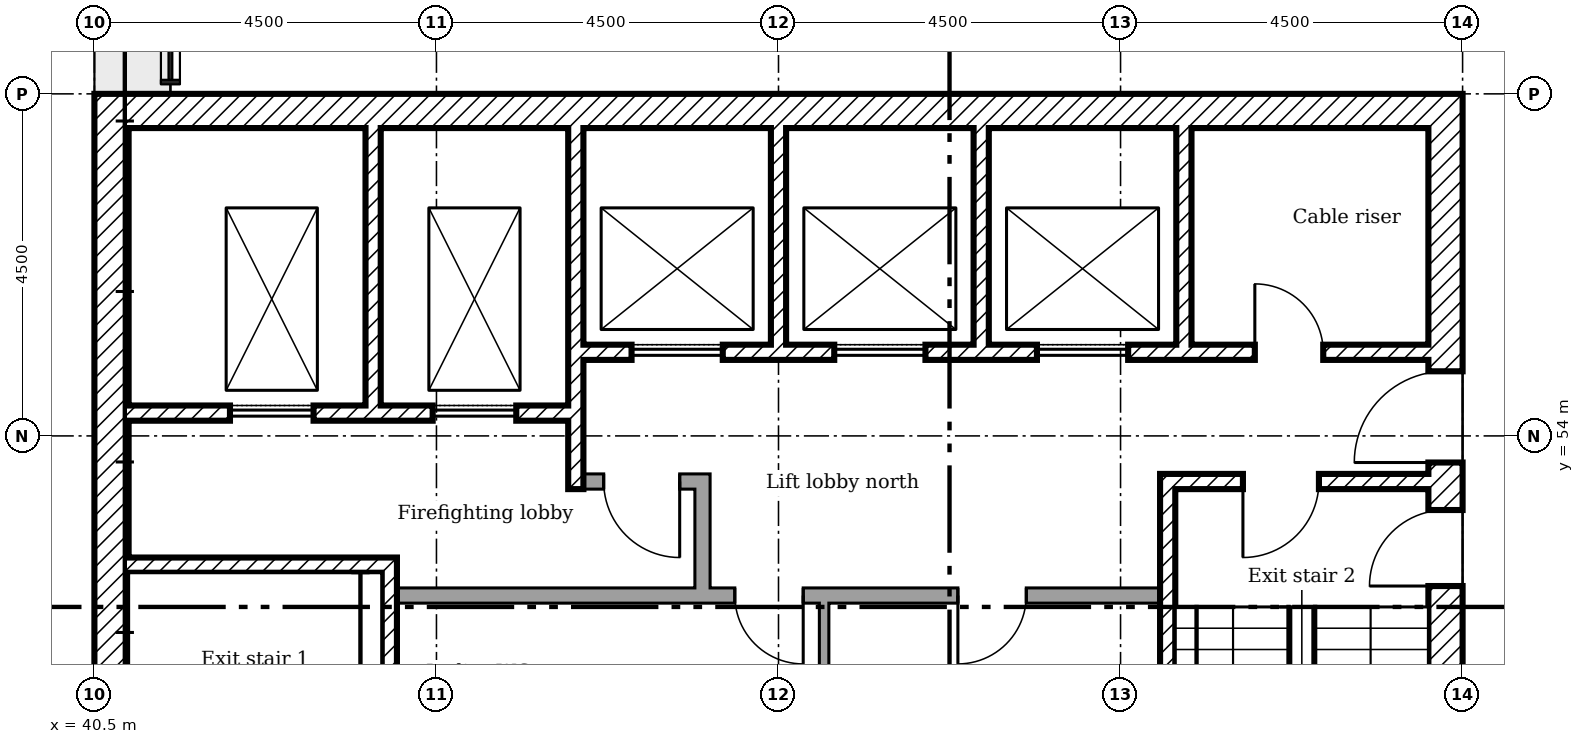
"""IFC4 building model, lengths in metres.
Left out: names, types, materials, properties, quantities, classifications, styles, units other than length and angle.
Written with IfcOpenShell. Run it as: python <this file> out.ifc"""

import sys

from ifc_helpers import new_model, si_unit, direction, frame, frame_2d, origin, place, context, subcontext, project, spatial, rectangle, extrude, element, fill, save


model = new_model("IFC4")
c1 = context("Model", 3, precision=1e-05, world=origin(), true_north=direction((0.0, 1.0)))
c2 = subcontext(c1, "Body", "Model", "MODEL_VIEW")
j1 = project(units=[si_unit("LENGTHUNIT", "METRE"), si_unit("PLANEANGLEUNIT", "RADIAN")], contexts=[c1])
p1 = place(None, origin())
s1 = spatial("IfcSite", under=j1, at=p1, CompositionType="ELEMENT")
p2 = place(p1, origin())
s2 = spatial("IfcBuilding", under=s1, at=p2, CompositionType="ELEMENT")
p3 = place(p2, frame((0.0, 0.0, 255.2)))
s3 = spatial("IfcBuildingStorey", under=s2, at=p3, CompositionType="ELEMENT", Elevation=255.2)
p4 = place(p3, frame((58.275, 40.5, 0.0), z_axis=(0.0, 0.0, 1.0), x_axis=(0.0, 1.0, 0.0)))
e1 = element("IfcWall", 1, at=p4, inside=s3, PredefinedType="SHEAR", context=c2, shape_type="SweptSolid", body=[
    extrude(rectangle(XDim=18.0, YDim=0.45, at=frame_2d((9.0, 0.0))), origin(), (0.0, 0.0, 1.0), 3.78),
])
p5 = place(p4, frame((13.15, 0.0, 0.0)))
e2 = element("IfcOpeningElement", 2, at=p5, cuts=e1, PredefinedType="OPENING", context=c2, shape_type="SweptSolid", body=[
    extrude(rectangle(XDim=1.2, YDim=2.1, at=frame_2d((0.6, 1.05))), frame((0.0, 0.235, 0.0), z_axis=(0.0, -1.0, 0.0), x_axis=(1.0, 0.0, 0.0)), (0.0, 0.0, 1.0), 0.47),
])
p6 = place(p4, frame((3.9, 0.0, 0.0)))
e3 = element("IfcOpeningElement", 3, at=p6, cuts=e1, PredefinedType="OPENING", context=c2, shape_type="SweptSolid", body=[
    extrude(rectangle(XDim=1.8, YDim=2.1, at=frame_2d((0.9, 1.05))), frame((0.0, 0.235, 0.0), z_axis=(0.0, -1.0, 0.0), x_axis=(1.0, 0.0, 0.0)), (0.0, 0.0, 1.0), 0.47),
])
p7 = place(p4, frame((11.525, 0.0, 0.0)))
e4 = element("IfcOpeningElement", 4, at=p7, cuts=e1, PredefinedType="OPENING", context=c2, shape_type="SweptSolid", body=[
    extrude(rectangle(XDim=1.0, YDim=2.1, at=frame_2d((0.5, 1.05))), frame((0.0, 0.235, 0.0), z_axis=(0.0, -1.0, 0.0), x_axis=(1.0, 0.0, 0.0)), (0.0, 0.0, 1.0), 0.47),
])
p8 = place(p3, frame((40.5, 58.275, 0.0)))
e5 = element("IfcWall", 5, at=p8, inside=s3, PredefinedType="SHEAR", context=c2, shape_type="SweptSolid", body=[
    extrude(rectangle(XDim=17.55, YDim=0.45, at=frame_2d((8.775, 0.0))), origin(), (0.0, 0.0, 1.0), 3.78),
])
p9 = place(p3, frame((40.725, 40.95, 0.0), z_axis=(0.0, 0.0, 1.0), x_axis=(0.0, 1.0, 0.0)))
e6 = element("IfcWall", 6, at=p9, inside=s3, PredefinedType="SHEAR", context=c2, shape_type="SweptSolid", body=[
    extrude(rectangle(XDim=17.1, YDim=0.45, at=frame_2d((8.55, 0.0))), origin(), (0.0, 0.0, 1.0), 3.78),
])
p10 = place(p3, frame((44.167, 58.05, 0.0), z_axis=(0.0, 0.0, 1.0), x_axis=(0.0, -1.0, 0.0)))
e7 = element("IfcWall", 7, at=p10, inside=s3, PredefinedType="SHEAR", context=c2, shape_type="SweptSolid", body=[
    extrude(rectangle(XDim=3.65, YDim=0.2, at=frame_2d((1.825, 0.0))), origin(), (0.0, 0.0, 1.0), 3.78),
])
p11 = place(p3, frame((46.833, 58.05, 0.0), z_axis=(0.0, 0.0, 1.0), x_axis=(0.0, -1.0, 0.0)))
e8 = element("IfcWall", 8, at=p11, inside=s3, PredefinedType="SHEAR", context=c2, shape_type="SweptSolid", body=[
    extrude(rectangle(XDim=4.75, YDim=0.2, at=frame_2d((2.375, 0.0))), origin(), (0.0, 0.0, 1.0), 3.78),
])
for number, where, z_axis, x_axis in (
    (9, (49.5, 58.05, 0.0), (0.0, 0.0, 1.0), (0.0, -1.0, 0.0)),
    (10, (52.167, 58.05, 0.0), (0.0, 0.0, 1.0), (0.0, -1.0, 0.0)),
    (11, (54.833, 58.05, 0.0), (0.0, 0.0, 1.0), (0.0, -1.0, 0.0)),
):
    element("IfcWall", number, at=place(p3, frame(where, z_axis=z_axis, x_axis=x_axis)), inside=s3, PredefinedType="SHEAR", context=c2, shape_type="SweptSolid", body=[
        extrude(rectangle(XDim=2.85, YDim=0.2, at=frame_2d((1.425, 0.0))), origin(), (0.0, 0.0, 1.0), 3.78),
    ])
p12 = place(p3, frame((48.5, 51.9, 0.0), z_axis=(0.0, 0.0, 1.0), x_axis=(0.0, 1.0, 0.0)))
e12 = element("IfcWall", 12, at=p12, inside=s3, PredefinedType="PARTITIONING", context=c2, shape_type="SweptSolid", body=[
    extrude(rectangle(XDim=1.6, YDim=0.2, at=frame_2d((0.8, 0.0))), origin(), (0.0, 0.0, 1.0), 3.78),
])
p13 = place(p3, frame((46.933, 53.4, 0.0)))
e13 = element("IfcWall", 13, at=p13, inside=s3, PredefinedType="PARTITIONING", context=c2, shape_type="SweptSolid", body=[
    extrude(rectangle(XDim=1.467, YDim=0.2, at=frame_2d((0.733, 0.0))), origin(), (0.0, 0.0, 1.0), 3.78),
])
p14 = place(p13, frame((0.267, 0.0, 0.0)))
e14 = element("IfcOpeningElement", 14, at=p14, cuts=e13, PredefinedType="OPENING", context=c2, shape_type="SweptSolid", body=[
    extrude(rectangle(XDim=1.0, YDim=2.1, at=frame_2d((0.5, 1.05))), frame((0.0, 0.11, 0.0), z_axis=(0.0, -1.0, 0.0), x_axis=(1.0, 0.0, 0.0)), (0.0, 0.0, 1.0), 0.22),
])
p15 = place(p3, frame((46.933, 55.1, 0.0)))
e15 = element("IfcWall", 15, at=p15, inside=s3, PredefinedType="SHEAR", context=c2, shape_type="SweptSolid", body=[
    extrude(rectangle(XDim=11.117, YDim=0.2, at=frame_2d((5.558, 0.0))), origin(), (0.0, 0.0, 1.0), 3.78),
])
p16 = place(p15, frame((8.833, 0.0, 0.0)))
e16 = element("IfcOpeningElement", 16, at=p16, cuts=e15, PredefinedType="OPENING", context=c2, shape_type="SweptSolid", body=[
    extrude(rectangle(XDim=0.9, YDim=2.1, at=frame_2d((0.45, 1.05))), frame((0.0, 0.11, 0.0), z_axis=(0.0, -1.0, 0.0), x_axis=(1.0, 0.0, 0.0)), (0.0, 0.0, 1.0), 0.22),
])
p17 = place(p15, frame((0.633, 0.0, 0.0)))
e17 = element("IfcOpeningElement", 17, at=p17, cuts=e15, PredefinedType="OPENING", context=c2, shape_type="SweptSolid", body=[
    extrude(rectangle(XDim=1.2, YDim=2.1, at=frame_2d((0.6, 1.05))), frame((0.0, 0.11, 0.0), z_axis=(0.0, -1.0, 0.0), x_axis=(1.0, 0.0, 0.0)), (0.0, 0.0, 1.0), 0.22),
])
p18 = place(p15, frame((3.3, 0.0, 0.0)))
e18 = element("IfcOpeningElement", 18, at=p18, cuts=e15, PredefinedType="OPENING", context=c2, shape_type="SweptSolid", body=[
    extrude(rectangle(XDim=1.2, YDim=2.1, at=frame_2d((0.6, 1.05))), frame((0.0, 0.11, 0.0), z_axis=(0.0, -1.0, 0.0), x_axis=(1.0, 0.0, 0.0)), (0.0, 0.0, 1.0), 0.22),
])
p19 = place(p15, frame((5.967, 0.0, 0.0)))
e19 = element("IfcOpeningElement", 19, at=p19, cuts=e15, PredefinedType="OPENING", context=c2, shape_type="SweptSolid", body=[
    extrude(rectangle(XDim=1.2, YDim=2.1, at=frame_2d((0.6, 1.05))), frame((0.0, 0.11, 0.0), z_axis=(0.0, -1.0, 0.0), x_axis=(1.0, 0.0, 0.0)), (0.0, 0.0, 1.0), 0.22),
])
p20 = place(p3, frame((40.95, 54.3, 0.0)))
e20 = element("IfcWall", 20, at=p20, inside=s3, PredefinedType="SHEAR", context=c2, shape_type="SweptSolid", body=[
    extrude(rectangle(XDim=5.783, YDim=0.2, at=frame_2d((2.892, 0.0))), origin(), (0.0, 0.0, 1.0), 3.78),
])
p21 = place(p20, frame((1.333, 0.0, 0.0)))
e21 = element("IfcOpeningElement", 21, at=p21, cuts=e20, PredefinedType="OPENING", context=c2, shape_type="SweptSolid", body=[
    extrude(rectangle(XDim=1.1, YDim=2.1, at=frame_2d((0.55, 1.05))), frame((0.0, 0.11, 0.0), z_axis=(0.0, -1.0, 0.0), x_axis=(1.0, 0.0, 0.0)), (0.0, 0.0, 1.0), 0.22),
])
p22 = place(p20, frame((4.0, 0.0, 0.0)))
e22 = element("IfcOpeningElement", 22, at=p22, cuts=e20, PredefinedType="OPENING", context=c2, shape_type="SweptSolid", body=[
    extrude(rectangle(XDim=1.1, YDim=2.1, at=frame_2d((0.55, 1.05))), frame((0.0, 0.11, 0.0), z_axis=(0.0, -1.0, 0.0), x_axis=(1.0, 0.0, 0.0)), (0.0, 0.0, 1.0), 0.22),
])
p23 = place(p3, frame((44.38, 45.5, 0.0), z_axis=(0.0, 0.0, 1.0), x_axis=(0.0, 1.0, 0.0)))
e23 = element("IfcWall", 23, at=p23, inside=s3, PredefinedType="SHEAR", context=c2, shape_type="SweptSolid", body=[
    extrude(rectangle(XDim=6.9, YDim=0.2, at=frame_2d((3.45, 0.0))), origin(), (0.0, 0.0, 1.0), 3.78),
])
p24 = place(p3, frame((40.95, 52.3, 0.0)))
e24 = element("IfcWall", 24, at=p24, inside=s3, PredefinedType="SHEAR", context=c2, shape_type="SweptSolid", body=[
    extrude(rectangle(XDim=3.33, YDim=0.2, at=frame_2d((1.665, 0.0))), origin(), (0.0, 0.0, 1.0), 3.78),
])
p25 = place(p3, frame((54.52, 53.4, 0.0)))
e25 = element("IfcWall", 25, at=p25, inside=s3, PredefinedType="SHEAR", context=c2, shape_type="SweptSolid", body=[
    extrude(rectangle(XDim=3.53, YDim=0.2, at=frame_2d((1.765, 0.0))), origin(), (0.0, 0.0, 1.0), 3.78),
])
p26 = place(p25, frame((1.09, 0.0, 0.0)))
e26 = element("IfcOpeningElement", 26, at=p26, cuts=e25, PredefinedType="OPENING", context=c2, shape_type="SweptSolid", body=[
    extrude(rectangle(XDim=1.0, YDim=2.1, at=frame_2d((0.5, 1.05))), frame((0.0, 0.11, 0.0), z_axis=(0.0, -1.0, 0.0), x_axis=(1.0, 0.0, 0.0)), (0.0, 0.0, 1.0), 0.22),
])
p27 = place(p3, frame((54.62, 46.8, 0.0), z_axis=(0.0, 0.0, 1.0), x_axis=(0.0, 1.0, 0.0)))
e27 = element("IfcWall", 27, at=p27, inside=s3, PredefinedType="SHEAR", context=c2, shape_type="SweptSolid", body=[
    extrude(rectangle(XDim=6.5, YDim=0.2, at=frame_2d((3.25, 0.0))), origin(), (0.0, 0.0, 1.0), 3.78),
])
p28 = place(p3, frame((44.48, 51.9, 0.0)))
e28 = element("IfcWall", 28, at=p28, inside=s3, PredefinedType="PARTITIONING", context=c2, shape_type="SweptSolid", body=[
    extrude(rectangle(XDim=10.04, YDim=0.2, at=frame_2d((5.02, 0.0))), origin(), (0.0, 0.0, 1.0), 3.78),
])
p29 = place(p28, frame((4.445, 0.0, 0.0)))
e29 = element("IfcOpeningElement", 29, at=p29, cuts=e28, PredefinedType="OPENING", context=c2, shape_type="SweptSolid", body=[
    extrude(rectangle(XDim=0.9, YDim=2.1, at=frame_2d((0.45, 1.05))), frame((0.0, 0.11, 0.0), z_axis=(0.0, -1.0, 0.0), x_axis=(1.0, 0.0, 0.0)), (0.0, 0.0, 1.0), 0.22),
])
p30 = place(p28, frame((7.38, 0.0, 0.0)))
e30 = element("IfcOpeningElement", 30, at=p30, cuts=e28, PredefinedType="OPENING", context=c2, shape_type="SweptSolid", body=[
    extrude(rectangle(XDim=0.9, YDim=2.1, at=frame_2d((0.45, 1.05))), frame((0.0, 0.11, 0.0), z_axis=(0.0, -1.0, 0.0), x_axis=(1.0, 0.0, 0.0)), (0.0, 0.0, 1.0), 0.22),
])
p31 = place(p3, frame((50.1, 49.9, 0.0), z_axis=(0.0, 0.0, 1.0), x_axis=(0.0, 1.0, 0.0)))
e31 = element("IfcWall", 31, at=p31, inside=s3, PredefinedType="PARTITIONING", context=c2, shape_type="SweptSolid", body=[
    extrude(rectangle(XDim=1.9, YDim=0.125, at=frame_2d((0.95, 0.0))), origin(), (0.0, 0.0, 1.0), 3.78),
])
p32 = place(p5, origin())
e32 = element("IfcDoor", 32, at=p32, inside=s3, OperationType="SINGLE_SWING_RIGHT", PredefinedType="DOOR", context=c2, shape_type="SweptSolid", body=[
    extrude(rectangle(XDim=1.2, YDim=2.1, at=frame_2d((0.6, 1.05))), frame((0.0, 0.025, 0.0), z_axis=(0.0, -1.0, 0.0), x_axis=(1.0, 0.0, 0.0)), (0.0, 0.0, 1.0), 0.05),
])
fill(e2, e32)
p33 = place(p26, frame((1.0, 0.0, 0.0), x_axis=(-1.0, 0.0, 0.0)))
e33 = element("IfcDoor", 33, at=p33, inside=s3, OperationType="SINGLE_SWING_LEFT", PredefinedType="DOOR", context=c2, shape_type="SweptSolid", body=[
    extrude(rectangle(XDim=1.0, YDim=2.1, at=frame_2d((0.5, 1.05))), frame((0.0, 0.025, 0.0), z_axis=(0.0, -1.0, 0.0), x_axis=(1.0, 0.0, 0.0)), (0.0, 0.0, 1.0), 0.05),
])
fill(e26, e33)
p34 = place(p7, origin())
e34 = element("IfcDoor", 34, at=p34, inside=s3, OperationType="SINGLE_SWING_RIGHT", PredefinedType="DOOR", context=c2, shape_type="SweptSolid", body=[
    extrude(rectangle(XDim=1.0, YDim=2.1, at=frame_2d((0.5, 1.05))), frame((0.0, 0.025, 0.0), z_axis=(0.0, -1.0, 0.0), x_axis=(1.0, 0.0, 0.0)), (0.0, 0.0, 1.0), 0.05),
])
fill(e4, e34)
p35 = place(p14, frame((1.0, 0.0, 0.0), x_axis=(-1.0, 0.0, 0.0)))
e35 = element("IfcDoor", 35, at=p35, inside=s3, OperationType="SINGLE_SWING_RIGHT", PredefinedType="DOOR", context=c2, shape_type="SweptSolid", body=[
    extrude(rectangle(XDim=1.0, YDim=2.1, at=frame_2d((0.5, 1.05))), frame((0.0, 0.025, 0.0), z_axis=(0.0, -1.0, 0.0), x_axis=(1.0, 0.0, 0.0)), (0.0, 0.0, 1.0), 0.05),
])
fill(e14, e35)
p36 = place(p16, origin())
e36 = element("IfcDoor", 36, at=p36, inside=s3, OperationType="SINGLE_SWING_RIGHT", PredefinedType="DOOR", context=c2, shape_type="SweptSolid", body=[
    extrude(rectangle(XDim=0.9, YDim=2.1, at=frame_2d((0.45, 1.05))), frame((0.0, 0.025, 0.0), z_axis=(0.0, -1.0, 0.0), x_axis=(1.0, 0.0, 0.0)), (0.0, 0.0, 1.0), 0.05),
])
fill(e16, e36)
p37 = place(p29, frame((0.9, 0.0, 0.0), x_axis=(-1.0, 0.0, 0.0)))
e37 = element("IfcDoor", 37, at=p37, inside=s3, OperationType="SINGLE_SWING_RIGHT", PredefinedType="DOOR", context=c2, shape_type="SweptSolid", body=[
    extrude(rectangle(XDim=0.9, YDim=2.1, at=frame_2d((0.45, 1.05))), frame((0.0, 0.025, 0.0), z_axis=(0.0, -1.0, 0.0), x_axis=(1.0, 0.0, 0.0)), (0.0, 0.0, 1.0), 0.05),
])
fill(e29, e37)
p38 = place(p30, frame((0.9, 0.0, 0.0), x_axis=(-1.0, 0.0, 0.0)))
e38 = element("IfcDoor", 38, at=p38, inside=s3, OperationType="SINGLE_SWING_LEFT", PredefinedType="DOOR", context=c2, shape_type="SweptSolid", body=[
    extrude(rectangle(XDim=0.9, YDim=2.1, at=frame_2d((0.45, 1.05))), frame((0.0, 0.025, 0.0), z_axis=(0.0, -1.0, 0.0), x_axis=(1.0, 0.0, 0.0)), (0.0, 0.0, 1.0), 0.05),
])
fill(e30, e38)
p39 = place(p21, origin())
e39 = element("IfcDoor", 39, at=p39, inside=s3, OperationType="SLIDING_TO_LEFT", PredefinedType="DOOR", context=c2, shape_type="SweptSolid", body=[
    extrude(rectangle(XDim=1.1, YDim=2.1, at=frame_2d((0.55, 1.05))), frame((0.0, 0.025, 0.0), z_axis=(0.0, -1.0, 0.0), x_axis=(1.0, 0.0, 0.0)), (0.0, 0.0, 1.0), 0.05),
])
fill(e21, e39)
p40 = place(p22, origin())
e40 = element("IfcDoor", 40, at=p40, inside=s3, OperationType="SLIDING_TO_LEFT", PredefinedType="DOOR", context=c2, shape_type="SweptSolid", body=[
    extrude(rectangle(XDim=1.1, YDim=2.1, at=frame_2d((0.55, 1.05))), frame((0.0, 0.025, 0.0), z_axis=(0.0, -1.0, 0.0), x_axis=(1.0, 0.0, 0.0)), (0.0, 0.0, 1.0), 0.05),
])
fill(e22, e40)
p41 = place(p17, origin())
e41 = element("IfcDoor", 41, at=p41, inside=s3, OperationType="SLIDING_TO_LEFT", PredefinedType="DOOR", context=c2, shape_type="SweptSolid", body=[
    extrude(rectangle(XDim=1.2, YDim=2.1, at=frame_2d((0.6, 1.05))), frame((0.0, 0.025, 0.0), z_axis=(0.0, -1.0, 0.0), x_axis=(1.0, 0.0, 0.0)), (0.0, 0.0, 1.0), 0.05),
])
fill(e17, e41)
p42 = place(p18, origin())
e42 = element("IfcDoor", 42, at=p42, inside=s3, OperationType="SLIDING_TO_LEFT", PredefinedType="DOOR", context=c2, shape_type="SweptSolid", body=[
    extrude(rectangle(XDim=1.2, YDim=2.1, at=frame_2d((0.6, 1.05))), frame((0.0, 0.025, 0.0), z_axis=(0.0, -1.0, 0.0), x_axis=(1.0, 0.0, 0.0)), (0.0, 0.0, 1.0), 0.05),
])
fill(e18, e42)
p43 = place(p19, origin())
e43 = element("IfcDoor", 43, at=p43, inside=s3, OperationType="SLIDING_TO_LEFT", PredefinedType="DOOR", context=c2, shape_type="SweptSolid", body=[
    extrude(rectangle(XDim=1.2, YDim=2.1, at=frame_2d((0.6, 1.05))), frame((0.0, 0.025, 0.0), z_axis=(0.0, -1.0, 0.0), x_axis=(1.0, 0.0, 0.0)), (0.0, 0.0, 1.0), 0.05),
])
fill(e19, e43)
save(model, sys.argv[1])
